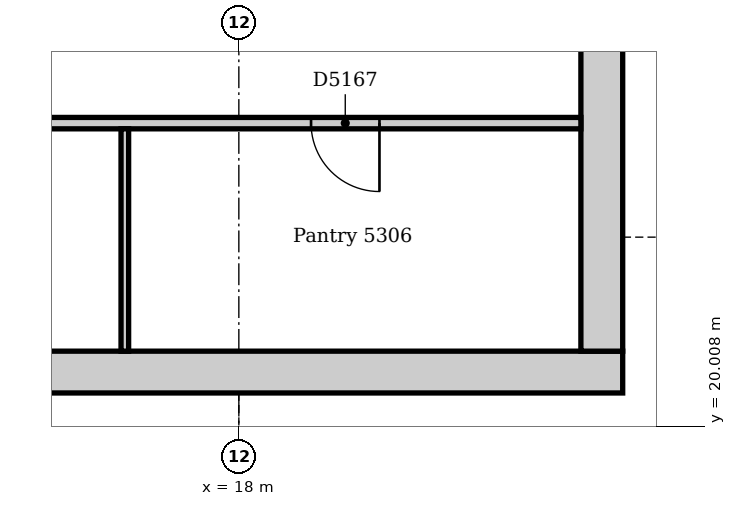
"""IFC4 building model, lengths in metres.
Left out: names, types, materials, properties, quantities, classifications, styles, units other than length and angle.
Written with IfcOpenShell. Run it as: python <this file> out.ifc"""

import sys

from ifc_helpers import new_model, si_unit, direction, frame, frame_2d, origin, place, context, subcontext, project, spatial, rectangle, extrude, element, fill, save


model = new_model("IFC4")
c1 = context("Model", 3, precision=1e-05, world=origin(), true_north=direction((0.0, 1.0)))
c2 = subcontext(c1, "Body", "Model", "MODEL_VIEW")
j1 = project(units=[si_unit("LENGTHUNIT", "METRE"), si_unit("PLANEANGLEUNIT", "RADIAN")], contexts=[c1])
p1 = place(None, origin())
s1 = spatial("IfcSite", under=j1, at=p1, CompositionType="ELEMENT")
p2 = place(p1, origin())
s2 = spatial("IfcBuilding", under=s1, at=p2, CompositionType="ELEMENT")
p3 = place(p2, frame((0.0, 0.0, 222.0)))
s3 = spatial("IfcBuildingStorey", under=s2, at=p3, CompositionType="ELEMENT", Elevation=222.0)
p4 = place(p3, frame((3.95, 20.725, 0.0), z_axis=(0.0, 0.0, 1.0), x_axis=(1.0, 0.0, 0.0)))
e1 = element("IfcWall", 1, at=p4, inside=s3, PredefinedType="SOLIDWALL", context=c2, shape_type="SweptSolid", body=[
    extrude(rectangle(XDim=19.1, YDim=0.55, at=frame_2d((9.55, 0.0))), origin(), (0.0, 0.0, 1.0), 4.0),
])
p5 = place(p3, frame((22.775, 21.0, 0.0), z_axis=(0.0, 0.0, 1.0), x_axis=(0.0, 1.0, 0.0)))
e2 = element("IfcWall", 2, at=p5, inside=s3, PredefinedType="SOLIDWALL", context=c2, shape_type="SweptSolid", body=[
    extrude(rectangle(XDim=10.5, YDim=0.55, at=frame_2d((5.25, 0.0))), origin(), (0.0, 0.0, 1.0), 4.0),
])
p6 = place(p5, frame((4.35, 0.0, 0.0)))
e3 = element("IfcOpeningElement", 3, at=p6, cuts=e2, PredefinedType="OPENING", context=c2, shape_type="SweptSolid", body=[
    extrude(rectangle(XDim=1.8, YDim=2.1, at=frame_2d((0.9, 1.05))), frame((0.0, 0.285, 0.0), z_axis=(0.0, -1.0, 0.0), x_axis=(1.0, 0.0, 0.0)), (0.0, 0.0, 1.0), 0.57),
])
p7 = place(p3, frame((4.5, 24.0, 0.0), z_axis=(0.0, 0.0, 1.0), x_axis=(1.0, 0.0, 0.0)))
e4 = element("IfcWall", 4, at=p7, inside=s3, PredefinedType="PARTITIONING", context=c2, shape_type="SweptSolid", body=[
    extrude(rectangle(XDim=18.0, YDim=0.15, at=frame_2d((9.0, 0.0))), origin(), (0.0, 0.0, 1.0), 3.85),
])
p8 = place(p7, frame((2.6, 0.0, 0.0)))
e5 = element("IfcOpeningElement", 5, at=p8, cuts=e4, PredefinedType="OPENING", context=c2, shape_type="SweptSolid", body=[
    extrude(rectangle(XDim=0.9, YDim=2.1, at=frame_2d((0.45, 1.05))), frame((0.0, 0.085, 0.0), z_axis=(0.0, -1.0, 0.0), x_axis=(1.0, 0.0, 0.0)), (0.0, 0.0, 1.0), 0.17),
])
p9 = place(p7, frame((8.55, 0.0, 0.0)))
e6 = element("IfcOpeningElement", 6, at=p9, cuts=e4, PredefinedType="OPENING", context=c2, shape_type="SweptSolid", body=[
    extrude(rectangle(XDim=0.9, YDim=2.1, at=frame_2d((0.45, 1.05))), frame((0.0, 0.085, 0.0), z_axis=(0.0, -1.0, 0.0), x_axis=(1.0, 0.0, 0.0)), (0.0, 0.0, 1.0), 0.17),
])
p10 = place(p7, frame((14.45, 0.0, 0.0)))
e7 = element("IfcOpeningElement", 7, at=p10, cuts=e4, PredefinedType="OPENING", context=c2, shape_type="SweptSolid", body=[
    extrude(rectangle(XDim=0.9, YDim=2.1, at=frame_2d((0.45, 1.05))), frame((0.0, 0.085, 0.0), z_axis=(0.0, -1.0, 0.0), x_axis=(1.0, 0.0, 0.0)), (0.0, 0.0, 1.0), 0.17),
])
p11 = place(p3, frame((16.5, 21.0, 0.0), z_axis=(0.0, 0.0, 1.0), x_axis=(0.0, 1.0, 0.0)))
e8 = element("IfcWall", 8, at=p11, inside=s3, PredefinedType="PARTITIONING", context=c2, shape_type="SweptSolid", body=[
    extrude(rectangle(XDim=2.925, YDim=0.1, at=frame_2d((1.462, 0.0))), origin(), (0.0, 0.0, 1.0), 3.85),
])
p12 = place(p10, frame((0.9, 0.0, 0.0), z_axis=(0.0, 0.0, 1.0), x_axis=(-1.0, 0.0, 0.0)))
e9 = element("IfcDoor", 9, at=p12, inside=s3, OperationType="SINGLE_SWING_LEFT", PredefinedType="DOOR", context=c2, shape_type="SweptSolid", body=[
    extrude(rectangle(XDim=0.9, YDim=2.1, at=frame_2d((0.45, 1.05))), frame((0.0, 0.025, 0.0), z_axis=(0.0, -1.0, 0.0), x_axis=(1.0, 0.0, 0.0)), (0.0, 0.0, 1.0), 0.05),
])
fill(e7, e9)
save(model, sys.argv[1])
